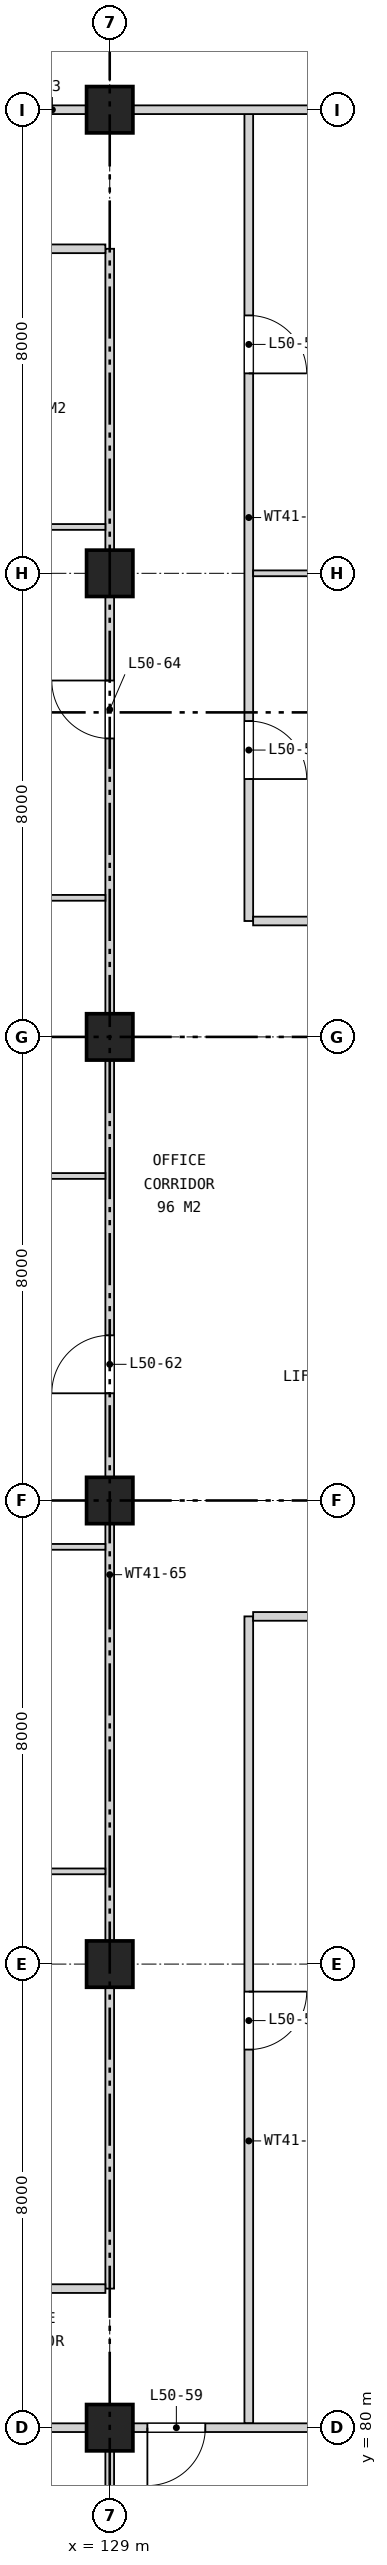
"""IFC4 building model, lengths in metres.
Left out: names, types, materials, properties, quantities, classifications, styles, units other than length and angle.
Written with IfcOpenShell. Run it as: python <this file> out.ifc"""

import sys

from ifc_helpers import new_model, si_unit, direction, frame, frame_2d, origin, origin_2d, place, context, subcontext, project, spatial, rectangle, extrude, element, fill, save


model = new_model("IFC4")
c1 = context("Model", 3, precision=1e-05, world=origin(), true_north=direction((0.0, 1.0)))
c2 = subcontext(c1, "Body", "Model", "MODEL_VIEW")
j1 = project(units=[si_unit("LENGTHUNIT", "METRE"), si_unit("PLANEANGLEUNIT", "RADIAN")], contexts=[c1])
p1 = place(None, origin())
s1 = spatial("IfcSite", under=j1, at=p1, CompositionType="ELEMENT")
p2 = place(p1, origin())
s2 = spatial("IfcBuilding", under=s1, at=p2, CompositionType="ELEMENT")
p3 = place(p2, frame((0.0, 0.0, 233.5)))
s3 = spatial("IfcBuildingStorey", under=s2, at=p3, CompositionType="ELEMENT", Elevation=233.5)
for number, where, z_axis, x_axis in (
    (1, (129.0, 80.0, 0.0), (0.0, 0.0, 1.0), (1.0, 0.0, 0.0)),
    (2, (129.0, 88.0, 0.0), (0.0, 0.0, 1.0), (1.0, 0.0, 0.0)),
    (3, (129.0, 96.0, 0.0), (0.0, 0.0, 1.0), (1.0, 0.0, 0.0)),
    (4, (129.0, 104.0, 0.0), (0.0, 0.0, 1.0), (1.0, 0.0, 0.0)),
    (5, (129.0, 112.0, 0.0), (0.0, 0.0, 1.0), (1.0, 0.0, 0.0)),
    (6, (129.0, 120.0, 0.0), (0.0, 0.0, 1.0), (1.0, 0.0, 0.0)),
):
    element("IfcColumn", number, at=place(p3, frame(where, z_axis=z_axis, x_axis=x_axis)), inside=s3, PredefinedType="COLUMN", context=c2, shape_type="SweptSolid", body=[
        extrude(rectangle(XDim=0.8, YDim=0.8, at=origin_2d()), origin(), (0.0, 0.0, 1.0), 4.2),
    ])
p4 = place(p3, frame((129.0, 71.68, 0.0), z_axis=(0.0, 0.0, 1.0), x_axis=(0.0, 1.0, 0.0)))
e7 = element("IfcWall", 7, at=p4, inside=s3, PredefinedType="PARTITIONING", context=c2, shape_type="SweptSolid", body=[
    extrude(rectangle(XDim=8.245, YDim=0.15, at=frame_2d((4.123, 0.0))), origin(), (0.0, 0.0, 1.0), 3.255),
])
p5 = place(p3, frame((129.0, 82.4, 0.0), z_axis=(0.0, 0.0, 1.0), x_axis=(0.0, 1.0, 0.0)))
e8 = element("IfcWall", 8, at=p5, inside=s3, PredefinedType="PARTITIONING", context=c2, shape_type="SweptSolid", body=[
    extrude(rectangle(XDim=35.2, YDim=0.15, at=frame_2d((17.6, 0.0))), origin(), (0.0, 0.0, 1.0), 3.255),
])
p6 = place(p5, frame((15.45, 0.0, 0.0)))
e9 = element("IfcOpeningElement", 9, at=p6, cuts=e8, PredefinedType="OPENING", context=c2, shape_type="SweptSolid", body=[
    extrude(rectangle(XDim=1.0, YDim=2.1, at=frame_2d((0.5, 1.05))), frame((0.0, 0.085, 0.0), z_axis=(0.0, -1.0, 0.0), x_axis=(1.0, 0.0, 0.0)), (0.0, 0.0, 1.0), 0.17),
])
p7 = place(p5, frame((26.75, 0.0, 0.0)))
e10 = element("IfcOpeningElement", 10, at=p7, cuts=e8, PredefinedType="OPENING", context=c2, shape_type="SweptSolid", body=[
    extrude(rectangle(XDim=1.0, YDim=2.1, at=frame_2d((0.5, 1.05))), frame((0.0, 0.085, 0.0), z_axis=(0.0, -1.0, 0.0), x_axis=(1.0, 0.0, 0.0)), (0.0, 0.0, 1.0), 0.17),
])
p8 = place(p3, frame((131.4, 80.075, 0.0), z_axis=(0.0, 0.0, 1.0), x_axis=(0.0, 1.0, 0.0)))
e11 = element("IfcWall", 11, at=p8, inside=s3, PredefinedType="PARTITIONING", context=c2, shape_type="SweptSolid", body=[
    extrude(rectangle(XDim=13.925, YDim=0.15, at=frame_2d((6.962, 0.0))), origin(), (0.0, 0.0, 1.0), 3.255),
])
p9 = place(p8, frame((6.45, 0.0, 0.0)))
e12 = element("IfcOpeningElement", 12, at=p9, cuts=e11, PredefinedType="OPENING", context=c2, shape_type="SweptSolid", body=[
    extrude(rectangle(XDim=1.0, YDim=2.1, at=frame_2d((0.5, 1.05))), frame((0.0, 0.085, 0.0), z_axis=(0.0, -1.0, 0.0), x_axis=(1.0, 0.0, 0.0)), (0.0, 0.0, 1.0), 0.17),
])
p10 = place(p3, frame((131.4, 106.0, 0.0), z_axis=(0.0, 0.0, 1.0), x_axis=(0.0, 1.0, 0.0)))
e13 = element("IfcWall", 13, at=p10, inside=s3, PredefinedType="PARTITIONING", context=c2, shape_type="SweptSolid", body=[
    extrude(rectangle(XDim=13.925, YDim=0.15, at=frame_2d((6.962, 0.0))), origin(), (0.0, 0.0, 1.0), 3.255),
])
p11 = place(p10, frame((2.45, 0.0, 0.0)))
e14 = element("IfcOpeningElement", 14, at=p11, cuts=e13, PredefinedType="OPENING", context=c2, shape_type="SweptSolid", body=[
    extrude(rectangle(XDim=1.0, YDim=2.1, at=frame_2d((0.5, 1.05))), frame((0.0, 0.085, 0.0), z_axis=(0.0, -1.0, 0.0), x_axis=(1.0, 0.0, 0.0)), (0.0, 0.0, 1.0), 0.17),
])
p12 = place(p10, frame((9.45, 0.0, 0.0)))
e15 = element("IfcOpeningElement", 15, at=p12, cuts=e13, PredefinedType="OPENING", context=c2, shape_type="SweptSolid", body=[
    extrude(rectangle(XDim=1.0, YDim=2.1, at=frame_2d((0.5, 1.05))), frame((0.0, 0.085, 0.0), z_axis=(0.0, -1.0, 0.0), x_axis=(1.0, 0.0, 0.0)), (0.0, 0.0, 1.0), 0.17),
])
p13 = place(p3, frame((112.68, 80.0, 0.0), z_axis=(0.0, 0.0, 1.0), x_axis=(1.0, 0.0, 0.0)))
e16 = element("IfcWall", 16, at=p13, inside=s3, PredefinedType="PARTITIONING", context=c2, shape_type="SweptSolid", body=[
    extrude(rectangle(XDim=24.64, YDim=0.15, at=frame_2d((12.32, 0.0))), origin(), (0.0, 0.0, 1.0), 3.255),
])
p14 = place(p13, frame((11.37, 0.0, 0.0)))
e17 = element("IfcOpeningElement", 17, at=p14, cuts=e16, PredefinedType="OPENING", context=c2, shape_type="SweptSolid", body=[
    extrude(rectangle(XDim=1.8, YDim=2.1, at=frame_2d((0.9, 1.05))), frame((0.0, 0.085, 0.0), z_axis=(0.0, -1.0, 0.0), x_axis=(1.0, 0.0, 0.0)), (0.0, 0.0, 1.0), 0.17),
])
p15 = place(p13, frame((16.97, 0.0, 0.0)))
e18 = element("IfcOpeningElement", 18, at=p15, cuts=e16, PredefinedType="OPENING", context=c2, shape_type="SweptSolid", body=[
    extrude(rectangle(XDim=1.0, YDim=2.1, at=frame_2d((0.5, 1.05))), frame((0.0, 0.085, 0.0), z_axis=(0.0, -1.0, 0.0), x_axis=(1.0, 0.0, 0.0)), (0.0, 0.0, 1.0), 0.17),
])
p16 = place(p3, frame((121.075, 82.4, 0.0), z_axis=(0.0, 0.0, 1.0), x_axis=(1.0, 0.0, 0.0)))
e19 = element("IfcWall", 19, at=p16, inside=s3, PredefinedType="PARTITIONING", context=c2, shape_type="SweptSolid", body=[
    extrude(rectangle(XDim=7.85, YDim=0.15, at=frame_2d((3.925, 0.0))), origin(), (0.0, 0.0, 1.0), 3.255),
])
p17 = place(p16, frame((3.45, 0.0, 0.0)))
e20 = element("IfcOpeningElement", 20, at=p17, cuts=e19, PredefinedType="OPENING", context=c2, shape_type="SweptSolid", body=[
    extrude(rectangle(XDim=1.0, YDim=2.1, at=frame_2d((0.5, 1.05))), frame((0.0, 0.085, 0.0), z_axis=(0.0, -1.0, 0.0), x_axis=(1.0, 0.0, 0.0)), (0.0, 0.0, 1.0), 0.17),
])
p18 = place(p3, frame((121.075, 89.6, 0.0), z_axis=(0.0, 0.0, 1.0), x_axis=(1.0, 0.0, 0.0)))
e21 = element("IfcWall", 21, at=p18, inside=s3, PredefinedType="PARTITIONING", context=c2, shape_type="SweptSolid", body=[
    extrude(rectangle(XDim=7.85, YDim=0.1, at=frame_2d((3.925, 0.0))), origin(), (0.0, 0.0, 1.0), 3.255),
])
p19 = place(p3, frame((131.475, 94.0, 0.0), z_axis=(0.0, 0.0, 1.0), x_axis=(1.0, 0.0, 0.0)))
e22 = element("IfcWall", 22, at=p19, inside=s3, PredefinedType="PARTITIONING", context=c2, shape_type="SweptSolid", body=[
    extrude(rectangle(XDim=5.525, YDim=0.15, at=frame_2d((2.762, 0.0))), origin(), (0.0, 0.0, 1.0), 3.255),
])
for number, where, z_axis, x_axis in (
    (23, (121.075, 95.2, 0.0), (0.0, 0.0, 1.0), (1.0, 0.0, 0.0)),
    (24, (121.075, 101.6, 0.0), (0.0, 0.0, 1.0), (1.0, 0.0, 0.0)),
):
    element("IfcWall", number, at=place(p3, frame(where, z_axis=z_axis, x_axis=x_axis)), inside=s3, PredefinedType="PARTITIONING", context=c2, shape_type="SweptSolid", body=[
        extrude(rectangle(XDim=7.85, YDim=0.1, at=frame_2d((3.925, 0.0))), origin(), (0.0, 0.0, 1.0), 3.255),
    ])
p20 = place(p3, frame((131.475, 106.0, 0.0), z_axis=(0.0, 0.0, 1.0), x_axis=(1.0, 0.0, 0.0)))
e25 = element("IfcWall", 25, at=p20, inside=s3, PredefinedType="PARTITIONING", context=c2, shape_type="SweptSolid", body=[
    extrude(rectangle(XDim=5.525, YDim=0.15, at=frame_2d((2.762, 0.0))), origin(), (0.0, 0.0, 1.0), 3.255),
])
p21 = place(p3, frame((121.075, 106.4, 0.0), z_axis=(0.0, 0.0, 1.0), x_axis=(1.0, 0.0, 0.0)))
e26 = element("IfcWall", 26, at=p21, inside=s3, PredefinedType="PARTITIONING", context=c2, shape_type="SweptSolid", body=[
    extrude(rectangle(XDim=7.85, YDim=0.1, at=frame_2d((3.925, 0.0))), origin(), (0.0, 0.0, 1.0), 3.255),
])
p22 = place(p3, frame((131.475, 112.0, 0.0), z_axis=(0.0, 0.0, 1.0), x_axis=(1.0, 0.0, 0.0)))
e27 = element("IfcWall", 27, at=p22, inside=s3, PredefinedType="PARTITIONING", context=c2, shape_type="SweptSolid", body=[
    extrude(rectangle(XDim=5.525, YDim=0.1, at=frame_2d((2.762, 0.0))), origin(), (0.0, 0.0, 1.0), 3.255),
])
p23 = place(p3, frame((121.075, 112.8, 0.0), z_axis=(0.0, 0.0, 1.0), x_axis=(1.0, 0.0, 0.0)))
e28 = element("IfcWall", 28, at=p23, inside=s3, PredefinedType="PARTITIONING", context=c2, shape_type="SweptSolid", body=[
    extrude(rectangle(XDim=7.85, YDim=0.1, at=frame_2d((3.925, 0.0))), origin(), (0.0, 0.0, 1.0), 3.255),
])
p24 = place(p3, frame((121.075, 117.6, 0.0), z_axis=(0.0, 0.0, 1.0), x_axis=(1.0, 0.0, 0.0)))
e29 = element("IfcWall", 29, at=p24, inside=s3, PredefinedType="PARTITIONING", context=c2, shape_type="SweptSolid", body=[
    extrude(rectangle(XDim=7.85, YDim=0.15, at=frame_2d((3.925, 0.0))), origin(), (0.0, 0.0, 1.0), 3.255),
])
p25 = place(p24, frame((3.45, 0.0, 0.0)))
e30 = element("IfcOpeningElement", 30, at=p25, cuts=e29, PredefinedType="OPENING", context=c2, shape_type="SweptSolid", body=[
    extrude(rectangle(XDim=1.0, YDim=2.1, at=frame_2d((0.5, 1.05))), frame((0.0, 0.085, 0.0), z_axis=(0.0, -1.0, 0.0), x_axis=(1.0, 0.0, 0.0)), (0.0, 0.0, 1.0), 0.17),
])
p26 = place(p3, frame((118.7, 120.0, 0.0), z_axis=(0.0, 0.0, 1.0), x_axis=(1.0, 0.0, 0.0)))
e31 = element("IfcWall", 31, at=p26, inside=s3, PredefinedType="PARTITIONING", context=c2, shape_type="SweptSolid", body=[
    extrude(rectangle(XDim=18.62, YDim=0.15, at=frame_2d((9.31, 0.0))), origin(), (0.0, 0.0, 1.0), 3.255),
])
p27 = place(p26, frame((5.45, 0.0, 0.0)))
e32 = element("IfcOpeningElement", 32, at=p27, cuts=e31, PredefinedType="OPENING", context=c2, shape_type="SweptSolid", body=[
    extrude(rectangle(XDim=1.8, YDim=2.1, at=frame_2d((0.9, 1.05))), frame((0.0, 0.085, 0.0), z_axis=(0.0, -1.0, 0.0), x_axis=(1.0, 0.0, 0.0)), (0.0, 0.0, 1.0), 0.17),
])
p28 = place(p11, frame((1.0, 0.0, 0.0), z_axis=(0.0, 0.0, 1.0), x_axis=(-1.0, 0.0, 0.0)))
e33 = element("IfcDoor", 33, at=p28, inside=s3, OperationType="SINGLE_SWING_RIGHT", PredefinedType="DOOR", context=c2, shape_type="SweptSolid", body=[
    extrude(rectangle(XDim=1.0, YDim=2.1, at=frame_2d((0.5, 1.05))), frame((0.0, 0.025, 0.0), z_axis=(0.0, -1.0, 0.0), x_axis=(1.0, 0.0, 0.0)), (0.0, 0.0, 1.0), 0.05),
])
fill(e14, e33)
p29 = place(p12, frame((1.0, 0.0, 0.0), z_axis=(0.0, 0.0, 1.0), x_axis=(-1.0, 0.0, 0.0)))
e34 = element("IfcDoor", 34, at=p29, inside=s3, OperationType="SINGLE_SWING_RIGHT", PredefinedType="DOOR", context=c2, shape_type="SweptSolid", body=[
    extrude(rectangle(XDim=1.0, YDim=2.1, at=frame_2d((0.5, 1.05))), frame((0.0, 0.025, 0.0), z_axis=(0.0, -1.0, 0.0), x_axis=(1.0, 0.0, 0.0)), (0.0, 0.0, 1.0), 0.05),
])
fill(e15, e34)
p30 = place(p9, frame((1.0, 0.0, 0.0), z_axis=(0.0, 0.0, 1.0), x_axis=(-1.0, 0.0, 0.0)))
e35 = element("IfcDoor", 35, at=p30, inside=s3, OperationType="SINGLE_SWING_LEFT", PredefinedType="DOOR", context=c2, shape_type="SweptSolid", body=[
    extrude(rectangle(XDim=1.0, YDim=2.1, at=frame_2d((0.5, 1.05))), frame((0.0, 0.025, 0.0), z_axis=(0.0, -1.0, 0.0), x_axis=(1.0, 0.0, 0.0)), (0.0, 0.0, 1.0), 0.05),
])
fill(e12, e35)
p31 = place(p15, frame((1.0, 0.0, 0.0), z_axis=(0.0, 0.0, 1.0), x_axis=(-1.0, 0.0, 0.0)))
e36 = element("IfcDoor", 36, at=p31, inside=s3, OperationType="SINGLE_SWING_RIGHT", PredefinedType="DOOR", context=c2, shape_type="SweptSolid", body=[
    extrude(rectangle(XDim=1.0, YDim=2.1, at=frame_2d((0.5, 1.05))), frame((0.0, 0.025, 0.0), z_axis=(0.0, -1.0, 0.0), x_axis=(1.0, 0.0, 0.0)), (0.0, 0.0, 1.0), 0.05),
])
fill(e18, e36)
p32 = place(p6, origin())
e37 = element("IfcDoor", 37, at=p32, inside=s3, OperationType="SINGLE_SWING_LEFT", PredefinedType="DOOR", context=c2, shape_type="SweptSolid", body=[
    extrude(rectangle(XDim=1.0, YDim=2.1, at=frame_2d((0.5, 1.05))), frame((0.0, 0.025, 0.0), z_axis=(0.0, -1.0, 0.0), x_axis=(1.0, 0.0, 0.0)), (0.0, 0.0, 1.0), 0.05),
])
fill(e9, e37)
p33 = place(p7, origin())
e38 = element("IfcDoor", 38, at=p33, inside=s3, OperationType="SINGLE_SWING_RIGHT", PredefinedType="DOOR", context=c2, shape_type="SweptSolid", body=[
    extrude(rectangle(XDim=1.0, YDim=2.1, at=frame_2d((0.5, 1.05))), frame((0.0, 0.025, 0.0), z_axis=(0.0, -1.0, 0.0), x_axis=(1.0, 0.0, 0.0)), (0.0, 0.0, 1.0), 0.05),
])
fill(e10, e38)
save(model, sys.argv[1])
